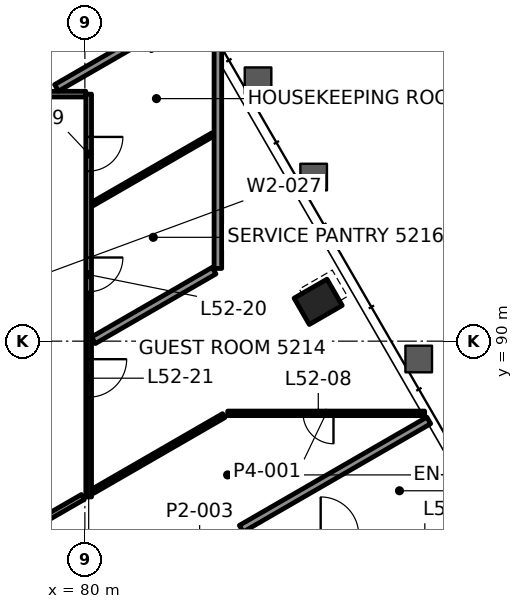
"""IFC4 building model, lengths in metres.
Left out: names, types, materials, properties, quantities, classifications, styles, units other than length and angle.
Written with IfcOpenShell. Run it as: python <this file> out.ifc"""

import sys

from ifc_helpers import new_model, si_unit, direction, frame, frame_2d, origin, origin_2d, place, context, subcontext, project, spatial, rectangle, hollow_rectangle, extrude, element, fill, save


model = new_model("IFC4")
c1 = context("Model", 3, precision=1e-05, world=origin(), true_north=direction((0.0, 1.0)))
c2 = subcontext(c1, "Body", "Model", "MODEL_VIEW")
j1 = project(units=[si_unit("LENGTHUNIT", "METRE"), si_unit("PLANEANGLEUNIT", "RADIAN")], contexts=[c1])
p1 = place(None, origin())
s1 = spatial("IfcSite", under=j1, at=p1, CompositionType="ELEMENT")
p2 = place(p1, origin())
s2 = spatial("IfcBuilding", under=s1, at=p2, CompositionType="ELEMENT")
p3 = place(p2, frame((0.0, 0.0, 222.1)))
s3 = spatial("IfcBuildingStorey", under=s2, at=p3, CompositionType="ELEMENT", Elevation=222.1)
p4 = place(p3, frame((86.138, 91.035, -0.0), z_axis=(0.0, 0.0, 1.0), x_axis=(-0.5, 0.866025403784, 0.0)))
e1 = element("IfcColumn", 1, at=p4, inside=s3, PredefinedType="COLUMN", context=c2, shape_type="SweptSolid", body=[
    extrude(hollow_rectangle(XDim=0.8, YDim=1.0, WallThickness=0.05, at=origin_2d()), origin(), (0.0, 0.0, 1.0), 3.9),
])
p5 = place(p3, frame((88.941, 88.1, 0.0), z_axis=(0.0, 0.0, 1.0), x_axis=(-1.0, 0.0, 0.0)))
e2 = element("IfcWall", 2, at=p5, inside=s3, PredefinedType="PARTITIONING", context=c2, shape_type="SweptSolid", body=[
    extrude(rectangle(XDim=5.183, YDim=0.12, at=frame_2d((2.592, 0.0))), origin(), (0.0, 0.0, 1.0), 3.022),
])
p6 = place(p5, frame((2.399, 0.0, 0.0)))
e3 = element("IfcOpeningElement", 3, at=p6, cuts=e2, PredefinedType="OPENING", context=c2, shape_type="SweptSolid", body=[
    extrude(rectangle(XDim=0.8, YDim=2.1, at=frame_2d((0.4, 1.05))), frame((0.0, 0.07, 0.0), z_axis=(0.0, -1.0, 0.0), x_axis=(1.0, 0.0, 0.0)), (0.0, 0.0, 1.0), 0.14),
])
p7 = place(p3, frame((75.975, 96.5, 0.0), z_axis=(0.0, 0.0, 1.0), x_axis=(1.0, 0.0, 0.0)))
e4 = element("IfcWall", 4, at=p7, inside=s3, PredefinedType="PARTITIONING", context=c2, shape_type="SweptSolid", body=[
    extrude(rectangle(XDim=4.049, YDim=0.15, at=frame_2d((2.025, 0.0))), origin(), (0.0, 0.0, 1.0), 3.1),
])
p8 = place(p3, frame((84.115, 85.065, 0.0), z_axis=(0.0, 0.0, 1.0), x_axis=(0.866027152591, 0.499996970966, 0.0)))
e5 = element("IfcWall", 5, at=p8, inside=s3, PredefinedType="PARTITIONING", context=c2, shape_type="SweptSolid", body=[
    extrude(rectangle(XDim=5.697, YDim=0.2, at=frame_2d((2.848, 0.0))), origin(), (0.0, 0.0, 1.0), 3.022),
])
p9 = place(p3, frame((78.458, 85.04, 0.0), z_axis=(0.0, 0.0, 1.0), x_axis=(0.865989383878, 0.500062383118, 0.0)))
e6 = element("IfcWall", 6, at=p9, inside=s3, PredefinedType="PARTITIONING", context=c2, shape_type="SweptSolid", body=[
    extrude(rectangle(XDim=1.72, YDim=0.15, at=frame_2d((0.86, 0.0))), origin(), (0.0, 0.0, 1.0), 3.1),
])
p10 = place(p3, frame((80.209, 86.052, 0.0), z_axis=(0.0, 0.0, 1.0), x_axis=(0.866032250876, 0.499988140302, 0.0)))
e7 = element("IfcWall", 7, at=p10, inside=s3, PredefinedType="PARTITIONING", context=c2, shape_type="SweptSolid", body=[
    extrude(rectangle(XDim=3.977, YDim=0.12, at=frame_2d((1.989, 0.0))), origin(), (0.0, 0.0, 1.0), 3.1),
])
p11 = place(p3, frame((80.227, 90.023, 0.0), z_axis=(0.0, 0.0, 1.0), x_axis=(0.866020252061, 0.500008922941, 0.0)))
e8 = element("IfcWall", 8, at=p11, inside=s3, PredefinedType="PARTITIONING", context=c2, shape_type="SweptSolid", body=[
    extrude(rectangle(XDim=3.664, YDim=0.2, at=frame_2d((1.832, 0.0))), origin(), (0.0, 0.0, 1.0), 3.1),
])
p12 = place(p3, frame((80.201, 93.61, 0.0), z_axis=(0.0, 0.0, 1.0), x_axis=(0.866020252061, 0.500008922941, 0.0)))
e9 = element("IfcWall", 9, at=p12, inside=s3, PredefinedType="PARTITIONING", context=c2, shape_type="SweptSolid", body=[
    extrude(rectangle(XDim=3.664, YDim=0.1, at=frame_2d((1.832, 0.0))), origin(), (0.0, 0.0, 1.0), 3.1),
])
p13 = place(p3, frame((79.255, 96.665, 0.0), z_axis=(0.0, 0.0, 1.0), x_axis=(0.866048852527, 0.499959383386, 0.0)))
e10 = element("IfcWall", 10, at=p13, inside=s3, PredefinedType="PARTITIONING", context=c2, shape_type="SweptSolid", body=[
    extrude(rectangle(XDim=2.646, YDim=0.2, at=frame_2d((1.323, 0.0))), origin(), (0.0, 0.0, 1.0), 3.1),
])
p14 = place(p3, frame((83.5, 91.913, 0.0), z_axis=(0.0, 0.0, 1.0), x_axis=(0.0, 1.0, 0.0)))
e11 = element("IfcWall", 11, at=p14, inside=s3, PredefinedType="PARTITIONING", context=c2, shape_type="SweptSolid", body=[
    extrude(rectangle(XDim=5.892, YDim=0.2, at=frame_2d((2.946, 0.0))), origin(), (0.0, 0.0, 1.0), 3.022),
])
p15 = place(p3, frame((80.1, 96.5, 0.0), z_axis=(0.0, 0.0, 1.0), x_axis=(0.0, -1.0, 0.0)))
e12 = element("IfcWall", 12, at=p15, inside=s3, PredefinedType="PARTITIONING", context=c2, shape_type="SweptSolid", body=[
    extrude(rectangle(XDim=10.6, YDim=0.15, at=frame_2d((5.3, 0.0))), origin(), (0.0, 0.0, 1.0), 3.1),
])
p16 = place(p15, frame((1.125, 0.0, 0.0)))
e13 = element("IfcOpeningElement", 13, at=p16, cuts=e12, PredefinedType="OPENING", context=c2, shape_type="SweptSolid", body=[
    extrude(rectangle(XDim=0.9, YDim=2.1, at=frame_2d((0.45, 1.05))), frame((0.0, 0.085, 0.0), z_axis=(0.0, -1.0, 0.0), x_axis=(1.0, 0.0, 0.0)), (0.0, 0.0, 1.0), 0.17),
])
p17 = place(p15, frame((4.299, 0.0, 0.0)))
e14 = element("IfcOpeningElement", 14, at=p17, cuts=e12, PredefinedType="OPENING", context=c2, shape_type="SweptSolid", body=[
    extrude(rectangle(XDim=0.9, YDim=2.1, at=frame_2d((0.45, 1.05))), frame((0.0, 0.085, 0.0), z_axis=(0.0, -1.0, 0.0), x_axis=(1.0, 0.0, 0.0)), (0.0, 0.0, 1.0), 0.17),
])
p18 = place(p15, frame((6.974, 0.0, 0.0)))
e15 = element("IfcOpeningElement", 15, at=p18, cuts=e12, PredefinedType="OPENING", context=c2, shape_type="SweptSolid", body=[
    extrude(rectangle(XDim=1.0, YDim=2.1, at=frame_2d((0.5, 1.05))), frame((0.0, 0.085, 0.0), z_axis=(0.0, -1.0, 0.0), x_axis=(1.0, 0.0, 0.0)), (0.0, 0.0, 1.0), 0.17),
])
p19 = place(p6, origin())
e16 = element("IfcDoor", 16, at=p19, inside=s3, OperationType="SINGLE_SWING_LEFT", PredefinedType="DOOR", context=c2, shape_type="SweptSolid", body=[
    extrude(rectangle(XDim=0.8, YDim=2.1, at=frame_2d((0.4, 1.05))), frame((0.0, 0.025, 0.0), z_axis=(0.0, -1.0, 0.0), x_axis=(1.0, 0.0, 0.0)), (0.0, 0.0, 1.0), 0.05),
])
fill(e3, e16)
p20 = place(p16, origin())
e17 = element("IfcDoor", 17, at=p20, inside=s3, OperationType="SINGLE_SWING_LEFT", PredefinedType="DOOR", context=c2, shape_type="SweptSolid", body=[
    extrude(rectangle(XDim=0.9, YDim=2.1, at=frame_2d((0.45, 1.05))), frame((0.0, 0.025, 0.0), z_axis=(0.0, -1.0, 0.0), x_axis=(1.0, 0.0, 0.0)), (0.0, 0.0, 1.0), 0.05),
])
fill(e13, e17)
p21 = place(p17, origin())
e18 = element("IfcDoor", 18, at=p21, inside=s3, OperationType="SINGLE_SWING_RIGHT", PredefinedType="DOOR", context=c2, shape_type="SweptSolid", body=[
    extrude(rectangle(XDim=0.9, YDim=2.1, at=frame_2d((0.45, 1.05))), frame((0.0, 0.025, 0.0), z_axis=(0.0, -1.0, 0.0), x_axis=(1.0, 0.0, 0.0)), (0.0, 0.0, 1.0), 0.05),
])
fill(e14, e18)
p22 = place(p18, origin())
e19 = element("IfcDoor", 19, at=p22, inside=s3, OperationType="SINGLE_SWING_RIGHT", PredefinedType="DOOR", context=c2, shape_type="SweptSolid", body=[
    extrude(rectangle(XDim=1.0, YDim=2.1, at=frame_2d((0.5, 1.05))), frame((0.0, 0.025, 0.0), z_axis=(0.0, -1.0, 0.0), x_axis=(1.0, 0.0, 0.0)), (0.0, 0.0, 1.0), 0.05),
])
fill(e15, e19)
save(model, sys.argv[1])
